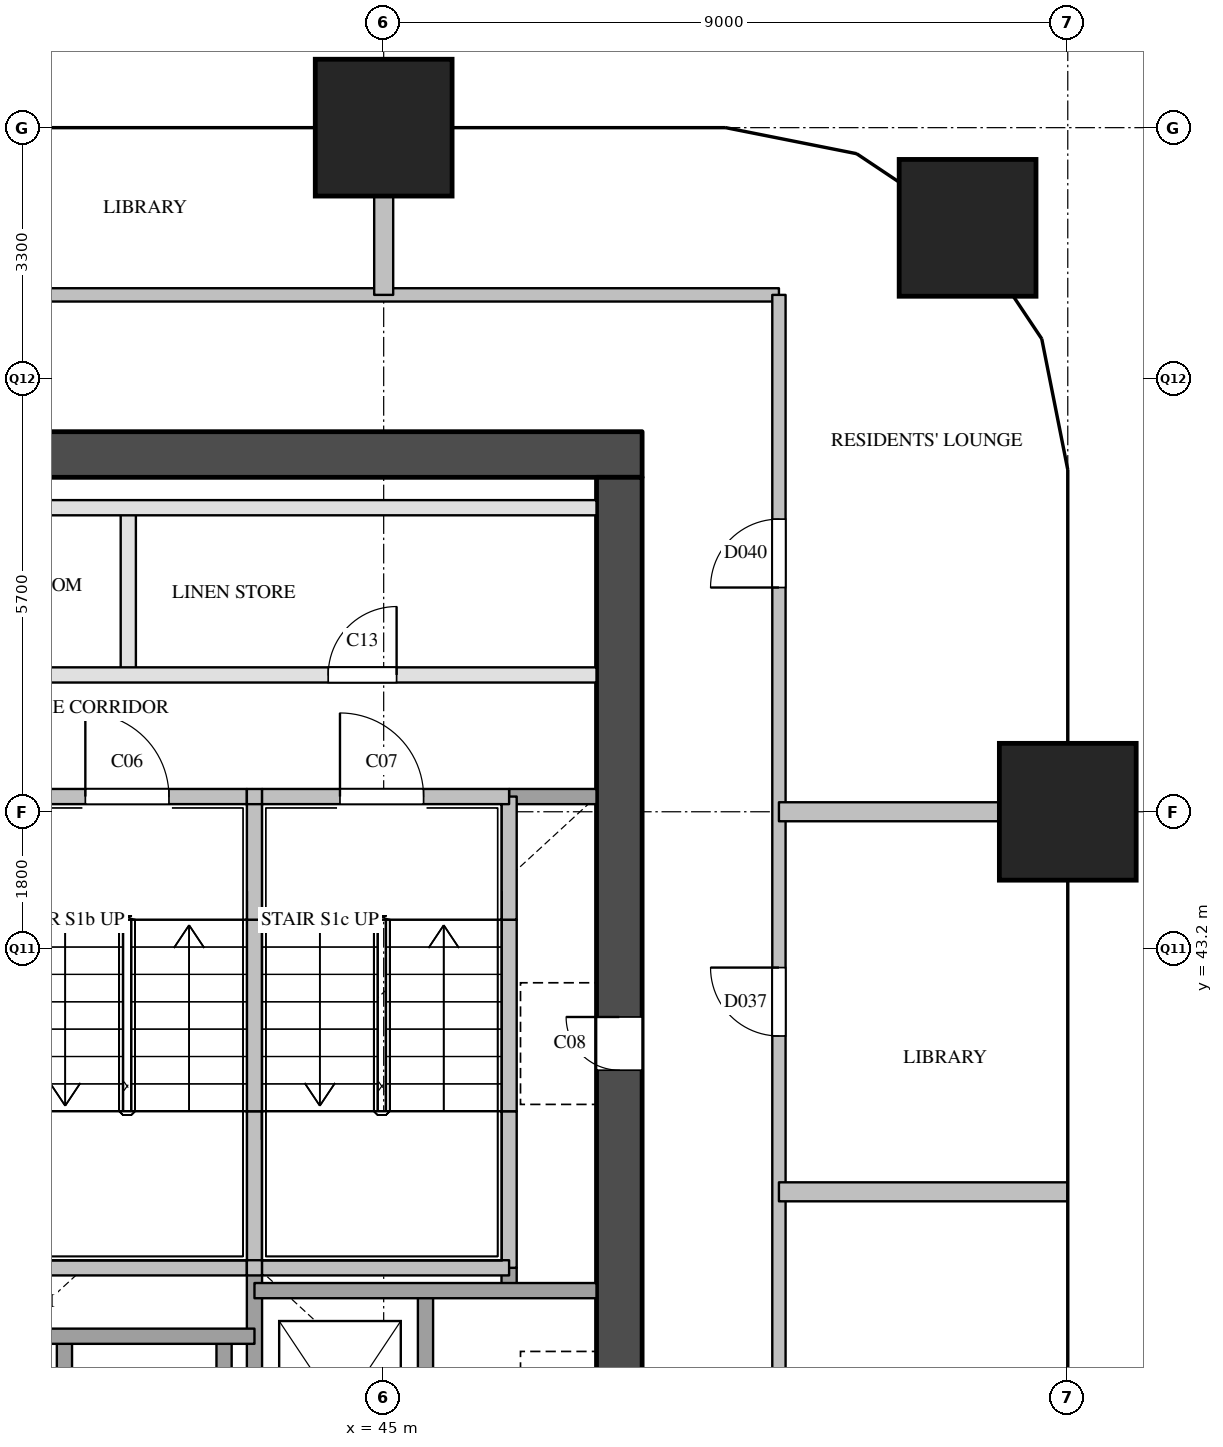
"""IFC4 building model, lengths in metres.
Left out: names, types, materials, properties, quantities, classifications, styles, units other than length and angle.
Written with IfcOpenShell. Run it as: python <this file> out.ifc"""

import sys

from ifc_helpers import new_model, si_unit, direction, frame, frame_2d, origin, origin_2d, place, context, subcontext, project, spatial, rectangle, extrude, element, fill, save


model = new_model("IFC4")
c1 = context("Model", 3, precision=1e-05, world=origin(), true_north=direction((0.0, 1.0)))
c2 = subcontext(c1, "Body", "Model", "MODEL_VIEW")
j1 = project(units=[si_unit("LENGTHUNIT", "METRE"), si_unit("PLANEANGLEUNIT", "RADIAN")], contexts=[c1])
p1 = place(None, origin())
s1 = spatial("IfcSite", under=j1, at=p1, CompositionType="ELEMENT")
p2 = place(p1, origin())
s2 = spatial("IfcBuilding", under=s1, at=p2, CompositionType="ELEMENT")
p3 = place(p2, frame((0.0, 0.0, 72.8)))
s3 = spatial("IfcBuildingStorey", under=s2, at=p3, CompositionType="ELEMENT", Elevation=72.8)
for number, where, z_axis, x_axis in (
    (1, (45.0, 54.0, 0.0), (0.0, 0.0, 1.0), (1.0, 0.0, 0.0)),
    (2, (54.0, 45.0, 0.0), (0.0, 0.0, 1.0), (1.0, 0.0, 0.0)),
    (3, (52.682, 52.682, 0.0), (0.0, 0.0, 1.0), (1.0, 0.0, 0.0)),
):
    element("IfcColumn", number, at=place(p3, frame(where, z_axis=z_axis, x_axis=x_axis)), inside=s3, PredefinedType="COLUMN", context=c2, shape_type="SweptSolid", body=[
        extrude(rectangle(XDim=1.8, YDim=1.8, at=origin_2d()), origin(), (0.0, 0.0, 1.0), 5.0),
    ])
p4 = place(p3, frame((36.0, 49.7, 0.0), z_axis=(0.0, 0.0, 1.0), x_axis=(1.0, 0.0, 0.0)))
e4 = element("IfcWall", 4, at=p4, inside=s3, PredefinedType="SHEAR", context=c2, shape_type="SweptSolid", body=[
    extrude(rectangle(XDim=12.4, YDim=0.6, at=frame_2d((6.2, 0.0))), origin(), (0.0, 0.0, 1.0), 4.7),
])
p5 = place(p3, frame((48.1, 29.1, 0.0), z_axis=(0.0, 0.0, 1.0), x_axis=(0.0, 1.0, 0.0)))
e5 = element("IfcWall", 5, at=p5, inside=s3, PredefinedType="SHEAR", context=c2, shape_type="SweptSolid", body=[
    extrude(rectangle(XDim=20.3, YDim=0.6, at=frame_2d((10.15, 0.0))), origin(), (0.0, 0.0, 1.0), 4.7),
])
p6 = place(p5, frame((12.5, 0.0, 0.0)))
e6 = element("IfcOpeningElement", 6, at=p6, cuts=e5, PredefinedType="OPENING", context=c2, shape_type="SweptSolid", body=[
    extrude(rectangle(XDim=0.7, YDim=2.1, at=frame_2d((0.35, 1.05))), frame((0.0, 0.31, 0.0), z_axis=(0.0, -1.0, 0.0), x_axis=(1.0, 0.0, 0.0)), (0.0, 0.0, 1.0), 0.62),
])
p7 = place(p5, frame((3.9, 0.0, 0.0)))
e7 = element("IfcOpeningElement", 7, at=p7, cuts=e5, PredefinedType="OPENING", context=c2, shape_type="SweptSolid", body=[
    extrude(rectangle(XDim=1.8, YDim=2.1, at=frame_2d((0.9, 1.05))), frame((0.0, 0.31, 0.0), z_axis=(0.0, -1.0, 0.0), x_axis=(1.0, 0.0, 0.0)), (0.0, 0.0, 1.0), 0.62),
])
p8 = place(p3, frame((40.8, 34.9, 0.0), z_axis=(0.0, 0.0, 1.0), x_axis=(0.0, 1.0, 0.0)))
e8 = element("IfcWall", 8, at=p8, inside=s3, PredefinedType="SOLIDWALL", context=c2, shape_type="SweptSolid", body=[
    extrude(rectangle(XDim=3.2, YDim=0.2, at=frame_2d((1.6, 0.0))), origin(), (0.0, 0.0, 1.0), 4.7),
])
p9 = place(p3, frame((41.64, 46.8, 0.0), z_axis=(0.0, 0.0, 1.0), x_axis=(0.0, 1.0, 0.0)))
e9 = element("IfcWall", 9, at=p9, inside=s3, PredefinedType="PARTITIONING", context=c2, shape_type="SweptSolid", body=[
    extrude(rectangle(XDim=2.2, YDim=0.2, at=frame_2d((1.1, 0.0))), origin(), (0.0, 0.0, 1.0), 4.7),
])
p10 = place(p3, frame((42.9, 34.9, 0.0), z_axis=(0.0, 0.0, 1.0), x_axis=(0.0, 1.0, 0.0)))
e10 = element("IfcWall", 10, at=p10, inside=s3, PredefinedType="SOLIDWALL", context=c2, shape_type="SweptSolid", body=[
    extrude(rectangle(XDim=3.2, YDim=0.2, at=frame_2d((1.6, 0.0))), origin(), (0.0, 0.0, 1.0), 4.7),
])
p11 = place(p3, frame((43.3, 29.1, 0.0), z_axis=(0.0, 0.0, 1.0), x_axis=(0.0, 1.0, 0.0)))
e11 = element("IfcWall", 11, at=p11, inside=s3, PredefinedType="SOLIDWALL", context=c2, shape_type="SweptSolid", body=[
    extrude(rectangle(XDim=9.9, YDim=0.2, at=frame_2d((4.95, 0.0))), origin(), (0.0, 0.0, 1.0), 4.7),
])
p12 = place(p3, frame((43.3, 39.0, 0.0), z_axis=(0.0, 0.0, 1.0), x_axis=(0.0, 1.0, 0.0)))
e12 = element("IfcWall", 12, at=p12, inside=s3, PredefinedType="SOLIDWALL", context=c2, shape_type="SweptSolid", body=[
    extrude(rectangle(XDim=2.06, YDim=0.2, at=frame_2d((1.03, 0.0))), origin(), (0.0, 0.0, 1.0), 4.7),
])
p13 = place(p3, frame((43.3, 41.06, 0.0), z_axis=(0.0, 0.0, 1.0), x_axis=(0.0, 1.0, 0.0)))
e13 = element("IfcWall", 13, at=p13, inside=s3, PredefinedType="SOLIDWALL", context=c2, shape_type="SweptSolid", body=[
    extrude(rectangle(XDim=2.52, YDim=0.2, at=frame_2d((1.26, 0.0))), origin(), (0.0, 0.0, 1.0), 4.7),
])
p14 = place(p3, frame((43.3, 43.58, 0.0), z_axis=(0.0, 0.0, 1.0), x_axis=(0.0, 1.0, 0.0)))
e14 = element("IfcWall", 14, at=p14, inside=s3, PredefinedType="SOLIDWALL", context=c2, shape_type="SweptSolid", body=[
    extrude(rectangle(XDim=1.62, YDim=0.2, at=frame_2d((0.81, 0.0))), origin(), (0.0, 0.0, 1.0), 4.7),
])
p15 = place(p3, frame((45.55, 35.5, 0.0), z_axis=(0.0, 0.0, 1.0), x_axis=(0.0, 1.0, 0.0)))
e15 = element("IfcWall", 15, at=p15, inside=s3, PredefinedType="SOLIDWALL", context=c2, shape_type="SweptSolid", body=[
    extrude(rectangle(XDim=3.2, YDim=0.2, at=frame_2d((1.6, 0.0))), origin(), (0.0, 0.0, 1.0), 4.7),
])
p16 = place(p3, frame((46.65, 38.7, 0.0), z_axis=(0.0, 0.0, 1.0), x_axis=(0.0, 1.0, 0.0)))
e16 = element("IfcWall", 16, at=p16, inside=s3, PredefinedType="SOLIDWALL", context=c2, shape_type="SweptSolid", body=[
    extrude(rectangle(XDim=0.3, YDim=0.2, at=frame_2d((0.15, 0.0))), origin(), (0.0, 0.0, 1.0), 4.7),
])
p17 = place(p3, frame((46.65, 39.0, 0.0), z_axis=(0.0, 0.0, 1.0), x_axis=(0.0, 1.0, 0.0)))
e17 = element("IfcWall", 17, at=p17, inside=s3, PredefinedType="SOLIDWALL", context=c2, shape_type="SweptSolid", body=[
    extrude(rectangle(XDim=2.06, YDim=0.2, at=frame_2d((1.03, 0.0))), origin(), (0.0, 0.0, 1.0), 4.7),
])
p18 = place(p3, frame((46.65, 41.06, 0.0), z_axis=(0.0, 0.0, 1.0), x_axis=(0.0, 1.0, 0.0)))
e18 = element("IfcWall", 18, at=p18, inside=s3, PredefinedType="SOLIDWALL", context=c2, shape_type="SweptSolid", body=[
    extrude(rectangle(XDim=2.52, YDim=0.2, at=frame_2d((1.26, 0.0))), origin(), (0.0, 0.0, 1.0), 4.7),
])
p19 = place(p3, frame((46.65, 43.58, 0.0), z_axis=(0.0, 0.0, 1.0), x_axis=(0.0, 1.0, 0.0)))
e19 = element("IfcWall", 19, at=p19, inside=s3, PredefinedType="SOLIDWALL", context=c2, shape_type="SweptSolid", body=[
    extrude(rectangle(XDim=1.62, YDim=0.2, at=frame_2d((0.81, 0.0))), origin(), (0.0, 0.0, 1.0), 4.7),
])
p20 = place(p3, frame((36.6, 38.1, 0.0), z_axis=(0.0, 0.0, 1.0), x_axis=(1.0, 0.0, 0.0)))
e20 = element("IfcWall", 20, at=p20, inside=s3, PredefinedType="SOLIDWALL", context=c2, shape_type="SweptSolid", body=[
    extrude(rectangle(XDim=6.7, YDim=0.2, at=frame_2d((3.35, 0.0))), origin(), (0.0, 0.0, 1.0), 4.7),
])
p21 = place(p3, frame((43.3, 38.7, 0.0), z_axis=(0.0, 0.0, 1.0), x_axis=(1.0, 0.0, 0.0)))
e21 = element("IfcWall", 21, at=p21, inside=s3, PredefinedType="SOLIDWALL", context=c2, shape_type="SweptSolid", body=[
    extrude(rectangle(XDim=4.5, YDim=0.2, at=frame_2d((2.25, 0.0))), origin(), (0.0, 0.0, 1.0), 4.7),
])
p22 = place(p3, frame((40.05, 39.0, 0.0), z_axis=(0.0, 0.0, 1.0), x_axis=(1.0, 0.0, 0.0)))
e22 = element("IfcWall", 22, at=p22, inside=s3, PredefinedType="SOLIDWALL", context=c2, shape_type="SweptSolid", body=[
    extrude(rectangle(XDim=3.15, YDim=0.2, at=frame_2d((1.575, 0.0))), origin(), (0.0, 0.0, 1.0), 4.7),
])
p23 = place(p3, frame((43.2, 39.0, 0.0), z_axis=(0.0, 0.0, 1.0), x_axis=(1.0, 0.0, 0.0)))
e23 = element("IfcWall", 23, at=p23, inside=s3, PredefinedType="SOLIDWALL", context=c2, shape_type="SweptSolid", body=[
    extrude(rectangle(XDim=0.2, YDim=0.2, at=frame_2d((0.1, 0.0))), origin(), (0.0, 0.0, 1.0), 4.7),
])
p24 = place(p3, frame((43.4, 39.0, 0.0), z_axis=(0.0, 0.0, 1.0), x_axis=(1.0, 0.0, 0.0)))
e24 = element("IfcWall", 24, at=p24, inside=s3, PredefinedType="SOLIDWALL", context=c2, shape_type="SweptSolid", body=[
    extrude(rectangle(XDim=3.25, YDim=0.2, at=frame_2d((1.625, 0.0))), origin(), (0.0, 0.0, 1.0), 4.7),
])
p25 = place(p3, frame((46.65, 45.2, 0.0), z_axis=(0.0, 0.0, 1.0), x_axis=(1.0, 0.0, 0.0)))
e25 = element("IfcWall", 25, at=p25, inside=s3, PredefinedType="SOLIDWALL", context=c2, shape_type="SweptSolid", body=[
    extrude(rectangle(XDim=1.15, YDim=0.2, at=frame_2d((0.575, 0.0))), origin(), (0.0, 0.0, 1.0), 4.7),
])
p26 = place(p3, frame((40.05, 45.2, 0.0), z_axis=(0.0, 0.0, 1.0), x_axis=(1.0, 0.0, 0.0)))
e26 = element("IfcWall", 26, at=p26, inside=s3, PredefinedType="SOLIDWALL", context=c2, shape_type="SweptSolid", body=[
    extrude(rectangle(XDim=3.15, YDim=0.2, at=frame_2d((1.575, 0.0))), origin(), (0.0, 0.0, 1.0), 4.7),
])
p27 = place(p26, frame((1.025, 0.0, 0.0)))
e27 = element("IfcOpeningElement", 27, at=p27, cuts=e26, PredefinedType="OPENING", context=c2, shape_type="SweptSolid", body=[
    extrude(rectangle(XDim=1.1, YDim=2.1, at=frame_2d((0.55, 1.05))), frame((0.0, 0.11, 0.0), z_axis=(0.0, -1.0, 0.0), x_axis=(1.0, 0.0, 0.0)), (0.0, 0.0, 1.0), 0.22),
])
p28 = place(p3, frame((43.2, 45.2, 0.0), z_axis=(0.0, 0.0, 1.0), x_axis=(1.0, 0.0, 0.0)))
e28 = element("IfcWall", 28, at=p28, inside=s3, PredefinedType="SOLIDWALL", context=c2, shape_type="SweptSolid", body=[
    extrude(rectangle(XDim=0.2, YDim=0.2, at=frame_2d((0.1, 0.0))), origin(), (0.0, 0.0, 1.0), 4.7),
])
p29 = place(p3, frame((43.4, 45.2, 0.0), z_axis=(0.0, 0.0, 1.0), x_axis=(1.0, 0.0, 0.0)))
e29 = element("IfcWall", 29, at=p29, inside=s3, PredefinedType="SOLIDWALL", context=c2, shape_type="SweptSolid", body=[
    extrude(rectangle(XDim=3.25, YDim=0.2, at=frame_2d((1.625, 0.0))), origin(), (0.0, 0.0, 1.0), 4.7),
])
p30 = place(p29, frame((1.025, 0.0, 0.0)))
e30 = element("IfcOpeningElement", 30, at=p30, cuts=e29, PredefinedType="OPENING", context=c2, shape_type="SweptSolid", body=[
    extrude(rectangle(XDim=1.1, YDim=2.1, at=frame_2d((0.55, 1.05))), frame((0.0, 0.11, 0.0), z_axis=(0.0, -1.0, 0.0), x_axis=(1.0, 0.0, 0.0)), (0.0, 0.0, 1.0), 0.22),
])
p31 = place(p3, frame((36.6, 46.8, 0.0), z_axis=(0.0, 0.0, 1.0), x_axis=(1.0, 0.0, 0.0)))
e31 = element("IfcWall", 31, at=p31, inside=s3, PredefinedType="PARTITIONING", context=c2, shape_type="SweptSolid", body=[
    extrude(rectangle(XDim=11.2, YDim=0.2, at=frame_2d((5.6, 0.0))), origin(), (0.0, 0.0, 1.0), 4.7),
])
p32 = place(p31, frame((2.07, 0.0, 0.0)))
e32 = element("IfcOpeningElement", 32, at=p32, cuts=e31, PredefinedType="OPENING", context=c2, shape_type="SweptSolid", body=[
    extrude(rectangle(XDim=0.9, YDim=2.1, at=frame_2d((0.45, 1.05))), frame((0.0, 0.11, 0.0), z_axis=(0.0, -1.0, 0.0), x_axis=(1.0, 0.0, 0.0)), (0.0, 0.0, 1.0), 0.22),
])
p33 = place(p31, frame((7.67, 0.0, 0.0)))
e33 = element("IfcOpeningElement", 33, at=p33, cuts=e31, PredefinedType="OPENING", context=c2, shape_type="SweptSolid", body=[
    extrude(rectangle(XDim=0.9, YDim=2.1, at=frame_2d((0.45, 1.05))), frame((0.0, 0.11, 0.0), z_axis=(0.0, -1.0, 0.0), x_axis=(1.0, 0.0, 0.0)), (0.0, 0.0, 1.0), 0.22),
])
p34 = place(p3, frame((36.6, 49.0, 0.0), z_axis=(0.0, 0.0, 1.0), x_axis=(1.0, 0.0, 0.0)))
e34 = element("IfcWall", 34, at=p34, inside=s3, PredefinedType="PARTITIONING", context=c2, shape_type="SweptSolid", body=[
    extrude(rectangle(XDim=11.2, YDim=0.2, at=frame_2d((5.6, 0.0))), origin(), (0.0, 0.0, 1.0), 4.7),
])
p35 = place(p3, frame((34.2, 51.8, 0.0), z_axis=(0.0, 0.0, 1.0), x_axis=(1.0, 0.0, 0.0)))
e35 = element("IfcWall", 35, at=p35, inside=s3, PredefinedType="PARTITIONING", context=c2, shape_type="SweptSolid", body=[
    extrude(rectangle(XDim=16.0, YDim=0.175, at=frame_2d((8.0, 0.0))), origin(), (0.0, 0.0, 1.0), 4.7),
])
p36 = place(p35, frame((5.35, 0.0, 0.0)))
e36 = element("IfcOpeningElement", 36, at=p36, cuts=e35, PredefinedType="OPENING", context=c2, shape_type="SweptSolid", body=[
    extrude(rectangle(XDim=0.9, YDim=2.1, at=frame_2d((0.45, 1.05))), frame((0.0, 0.097, 0.0), z_axis=(0.0, -1.0, 0.0), x_axis=(1.0, 0.0, 0.0)), (0.0, 0.0, 1.0), 0.195),
])
p37 = place(p3, frame((50.2, 26.7, 0.0), z_axis=(0.0, 0.0, 1.0), x_axis=(0.0, 1.0, 0.0)))
e37 = element("IfcWall", 37, at=p37, inside=s3, PredefinedType="PARTITIONING", context=c2, shape_type="SweptSolid", body=[
    extrude(rectangle(XDim=25.1, YDim=0.175, at=frame_2d((12.55, 0.0))), origin(), (0.0, 0.0, 1.0), 3.7),
])
p38 = place(p37, frame((1.2, 0.0, 0.0)))
e38 = element("IfcOpeningElement", 38, at=p38, cuts=e37, PredefinedType="OPENING", context=c2, shape_type="SweptSolid", body=[
    extrude(rectangle(XDim=0.9, YDim=2.1, at=frame_2d((0.45, 1.05))), frame((0.0, 0.097, 0.0), z_axis=(0.0, -1.0, 0.0), x_axis=(1.0, 0.0, 0.0)), (0.0, 0.0, 1.0), 0.195),
])
p39 = place(p37, frame((7.85, 0.0, 0.0)))
e39 = element("IfcOpeningElement", 39, at=p39, cuts=e37, PredefinedType="OPENING", context=c2, shape_type="SweptSolid", body=[
    extrude(rectangle(XDim=0.9, YDim=2.1, at=frame_2d((0.45, 1.05))), frame((0.0, 0.097, 0.0), z_axis=(0.0, -1.0, 0.0), x_axis=(1.0, 0.0, 0.0)), (0.0, 0.0, 1.0), 0.195),
])
p40 = place(p37, frame((15.35, 0.0, 0.0)))
e40 = element("IfcOpeningElement", 40, at=p40, cuts=e37, PredefinedType="OPENING", context=c2, shape_type="SweptSolid", body=[
    extrude(rectangle(XDim=0.9, YDim=2.1, at=frame_2d((0.45, 1.05))), frame((0.0, 0.097, 0.0), z_axis=(0.0, -1.0, 0.0), x_axis=(1.0, 0.0, 0.0)), (0.0, 0.0, 1.0), 0.195),
])
p41 = place(p37, frame((21.25, 0.0, 0.0)))
e41 = element("IfcOpeningElement", 41, at=p41, cuts=e37, PredefinedType="OPENING", context=c2, shape_type="SweptSolid", body=[
    extrude(rectangle(XDim=0.9, YDim=2.1, at=frame_2d((0.45, 1.05))), frame((0.0, 0.097, 0.0), z_axis=(0.0, -1.0, 0.0), x_axis=(1.0, 0.0, 0.0)), (0.0, 0.0, 1.0), 0.195),
])
p42 = place(p3, frame((50.2, 40.0, 0.0), z_axis=(0.0, 0.0, 1.0), x_axis=(1.0, 0.0, 0.0)))
e42 = element("IfcWall", 42, at=p42, inside=s3, PredefinedType="PARTITIONING", context=c2, shape_type="SweptSolid", body=[
    extrude(rectangle(XDim=3.8, YDim=0.25, at=frame_2d((1.9, 0.0))), origin(), (0.0, 0.0, 1.0), 3.7),
])
p43 = place(p3, frame((50.2, 45.0, 0.0), z_axis=(0.0, 0.0, 1.0), x_axis=(1.0, 0.0, 0.0)))
e43 = element("IfcWall", 43, at=p43, inside=s3, PredefinedType="PARTITIONING", context=c2, shape_type="SweptSolid", body=[
    extrude(rectangle(XDim=3.8, YDim=0.25, at=frame_2d((1.9, 0.0))), origin(), (0.0, 0.0, 1.0), 4.7),
])
p44 = place(p3, frame((45.0, 51.8, 0.0), z_axis=(0.0, 0.0, 1.0), x_axis=(0.0, 1.0, 0.0)))
e44 = element("IfcWall", 44, at=p44, inside=s3, PredefinedType="PARTITIONING", context=c2, shape_type="SweptSolid", body=[
    extrude(rectangle(XDim=2.2, YDim=0.25, at=frame_2d((1.1, 0.0))), origin(), (0.0, 0.0, 1.0), 4.7),
])
p45 = place(p27, origin())
e45 = element("IfcDoor", 45, at=p45, inside=s3, OperationType="SINGLE_SWING_LEFT", PredefinedType="DOOR", context=c2, shape_type="SweptSolid", body=[
    extrude(rectangle(XDim=1.1, YDim=2.1, at=frame_2d((0.55, 1.05))), frame((0.0, 0.025, 0.0), z_axis=(0.0, -1.0, 0.0), x_axis=(1.0, 0.0, 0.0)), (0.0, 0.0, 1.0), 0.05),
])
fill(e27, e45)
p46 = place(p30, origin())
e46 = element("IfcDoor", 46, at=p46, inside=s3, OperationType="SINGLE_SWING_LEFT", PredefinedType="DOOR", context=c2, shape_type="SweptSolid", body=[
    extrude(rectangle(XDim=1.1, YDim=2.1, at=frame_2d((0.55, 1.05))), frame((0.0, 0.025, 0.0), z_axis=(0.0, -1.0, 0.0), x_axis=(1.0, 0.0, 0.0)), (0.0, 0.0, 1.0), 0.05),
])
fill(e30, e46)
p47 = place(p6, origin())
e47 = element("IfcDoor", 47, at=p47, inside=s3, OperationType="SINGLE_SWING_RIGHT", PredefinedType="DOOR", context=c2, shape_type="SweptSolid", body=[
    extrude(rectangle(XDim=0.7, YDim=2.1, at=frame_2d((0.35, 1.05))), frame((0.0, 0.025, 0.0), z_axis=(0.0, -1.0, 0.0), x_axis=(1.0, 0.0, 0.0)), (0.0, 0.0, 1.0), 0.05),
])
fill(e6, e47)
p48 = place(p33, origin())
e48 = element("IfcDoor", 48, at=p48, inside=s3, OperationType="SINGLE_SWING_RIGHT", PredefinedType="DOOR", context=c2, shape_type="SweptSolid", body=[
    extrude(rectangle(XDim=0.9, YDim=2.1, at=frame_2d((0.45, 1.05))), frame((0.0, 0.025, 0.0), z_axis=(0.0, -1.0, 0.0), x_axis=(1.0, 0.0, 0.0)), (0.0, 0.0, 1.0), 0.05),
])
fill(e33, e48)
p49 = place(p40, origin())
e49 = element("IfcDoor", 49, at=p49, inside=s3, OperationType="SINGLE_SWING_RIGHT", PredefinedType="DOOR", context=c2, shape_type="SweptSolid", body=[
    extrude(rectangle(XDim=0.9, YDim=2.1, at=frame_2d((0.45, 1.05))), frame((0.0, 0.025, 0.0), z_axis=(0.0, -1.0, 0.0), x_axis=(1.0, 0.0, 0.0)), (0.0, 0.0, 1.0), 0.05),
])
fill(e40, e49)
p50 = place(p41, origin())
e50 = element("IfcDoor", 50, at=p50, inside=s3, OperationType="SINGLE_SWING_LEFT", PredefinedType="DOOR", context=c2, shape_type="SweptSolid", body=[
    extrude(rectangle(XDim=0.9, YDim=2.1, at=frame_2d((0.45, 1.05))), frame((0.0, 0.025, 0.0), z_axis=(0.0, -1.0, 0.0), x_axis=(1.0, 0.0, 0.0)), (0.0, 0.0, 1.0), 0.05),
])
fill(e41, e50)
save(model, sys.argv[1])
